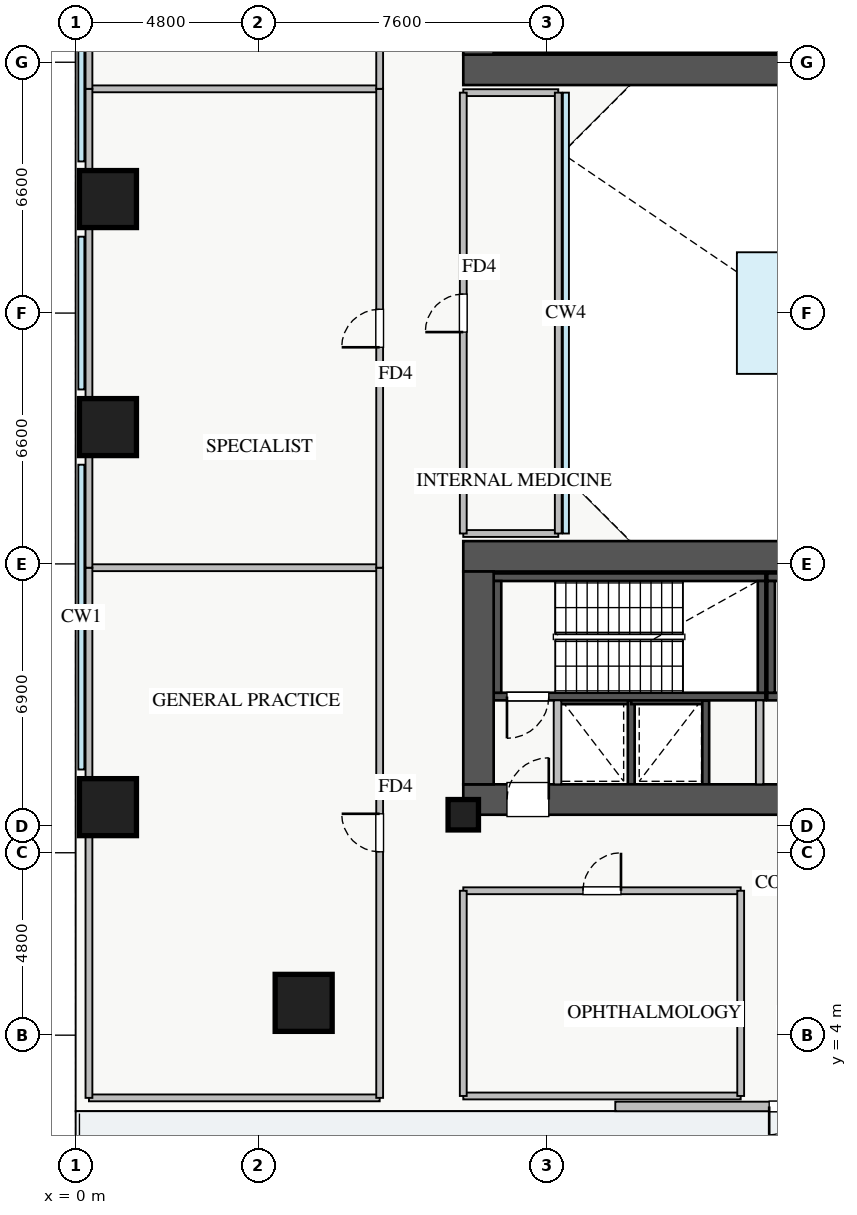
"""IFC4 building model, lengths in metres.
Left out: names, types, materials, properties, quantities, classifications, styles, units other than length and angle.
Written with IfcOpenShell. Run it as: python <this file> out.ifc"""

import sys

from ifc_helpers import new_model, si_unit, direction, frame, frame_2d, origin, origin_2d, place, context, subcontext, project, spatial, rectangle, extrude, source, transform, mapped, element, fill, save


model = new_model("IFC4")
c1 = context("Model", 3, precision=1e-05, world=origin(), true_north=direction((0.0, 1.0)))
c2 = subcontext(c1, "Body", "Model", "MODEL_VIEW")
j1 = project(units=[si_unit("LENGTHUNIT", "METRE"), si_unit("PLANEANGLEUNIT", "RADIAN")], contexts=[c1])
p1 = place(None, origin())
s1 = spatial("IfcSite", under=j1, at=p1, CompositionType="ELEMENT")
p2 = place(p1, origin())
s2 = spatial("IfcBuilding", under=s1, at=p2, CompositionType="ELEMENT")
p3 = place(p2, frame((0.0, 0.0, 5.0)))
s3 = spatial("IfcBuildingStorey", under=s2, at=p3, CompositionType="ELEMENT", Elevation=5.0)
p4 = place(p3, frame((12.68, 12.8, 0.0), z_axis=(0.0, 0.0, 1.0), x_axis=(1.0, 0.0, 0.0)))
e1 = element("IfcWall", 1, at=p4, inside=s3, PredefinedType="SHEAR", context=c2, shape_type="SweptSolid", body=[
    extrude(rectangle(XDim=1.94, YDim=0.18, at=frame_2d((0.97, 0.0))), origin(), (0.0, 0.0, 1.0), 4.18),
])
p5 = place(p3, frame((14.62, 10.6, 0.0), z_axis=(0.0, 0.0, 1.0), x_axis=(0.0, 1.0, 0.0)))
e2 = element("IfcWall", 2, at=p5, inside=s3, PredefinedType="SHEAR", context=c2, shape_type="SweptSolid", body=[
    extrude(rectangle(XDim=2.2, YDim=0.18, at=frame_2d((1.1, 0.0))), origin(), (0.0, 0.0, 1.0), 4.18),
])
p6 = place(p3, frame((14.62, 12.8, 0.0), z_axis=(0.0, 0.0, 1.0), x_axis=(1.0, 0.0, 0.0)))
e3 = element("IfcWall", 3, at=p6, inside=s3, PredefinedType="SHEAR", context=c2, shape_type="SweptSolid", body=[
    extrude(rectangle(XDim=1.96, YDim=0.18, at=frame_2d((0.98, 0.0))), origin(), (0.0, 0.0, 1.0), 4.18),
])
p7 = place(p3, frame((16.58, 10.6, 0.0), z_axis=(0.0, 0.0, 1.0), x_axis=(0.0, 1.0, 0.0)))
e4 = element("IfcWall", 4, at=p7, inside=s3, PredefinedType="SHEAR", context=c2, shape_type="SweptSolid", body=[
    extrude(rectangle(XDim=2.2, YDim=0.18, at=frame_2d((1.1, 0.0))), origin(), (0.0, 0.0, 1.0), 4.18),
])
p8 = place(p3, frame((11.0, 29.95, 0.0), z_axis=(0.0, 0.0, 1.0), x_axis=(1.0, 0.0, 0.0)))
e5 = element("IfcWall", 5, at=p8, inside=s3, PredefinedType="SHEAR", context=c2, shape_type="SweptSolid", body=[
    extrude(rectangle(XDim=7.15, YDim=0.2, at=frame_2d((3.575, 0.0))), origin(), (0.0, 0.0, 1.0), 4.4),
])
p9 = place(p3, frame((18.2, 29.95, 0.0), z_axis=(0.0, 0.0, 1.0), x_axis=(1.0, 0.0, 0.0)))
e6 = element("IfcWall", 6, at=p9, inside=s3, PredefinedType="SHEAR", context=c2, shape_type="SweptSolid", body=[
    extrude(rectangle(XDim=7.15, YDim=0.2, at=frame_2d((3.575, 0.0))), origin(), (0.0, 0.0, 1.0), 4.4),
])
p10 = place(p3, frame((11.0, 12.91, 0.0), z_axis=(0.0, 0.0, 1.0), x_axis=(1.0, 0.0, 0.0)))
e7 = element("IfcWall", 7, at=p10, inside=s3, PredefinedType="SHEAR", context=c2, shape_type="SweptSolid", body=[
    extrude(rectangle(XDim=7.15, YDim=0.2, at=frame_2d((3.575, 0.0))), origin(), (0.0, 0.0, 1.0), 4.4),
])
p11 = place(p10, frame((0.35, 0.0, 0.0)))
e8 = element("IfcOpeningElement", 8, at=p11, cuts=e7, PredefinedType="OPENING", context=c2, shape_type="SweptSolid", body=[
    extrude(rectangle(XDim=1.1, YDim=2.05, at=frame_2d((0.55, 1.025))), frame((0.0, 0.11, 0.0), z_axis=(0.0, -1.0, 0.0), x_axis=(1.0, 0.0, 0.0)), (0.0, 0.0, 1.0), 0.22),
])
p12 = place(p3, frame((11.0, 16.05, 0.0), z_axis=(0.0, 0.0, 1.0), x_axis=(1.0, 0.0, 0.0)))
e9 = element("IfcWall", 9, at=p12, inside=s3, PredefinedType="SHEAR", context=c2, shape_type="SweptSolid", body=[
    extrude(rectangle(XDim=7.15, YDim=0.2, at=frame_2d((3.575, 0.0))), origin(), (0.0, 0.0, 1.0), 4.4),
])
for number, where, z_axis, x_axis in (
    (10, (11.1, 13.01, 0.0), (0.0, 0.0, 1.0), (0.0, 1.0, 0.0)),
    (11, (18.05, 13.01, 0.0), (0.0, 0.0, 1.0), (0.0, 1.0, 0.0)),
):
    element("IfcWall", number, at=place(p3, frame(where, z_axis=z_axis, x_axis=x_axis)), inside=s3, PredefinedType="SHEAR", context=c2, shape_type="SweptSolid", body=[
        extrude(rectangle(XDim=2.94, YDim=0.2, at=frame_2d((1.47, 0.0))), origin(), (0.0, 0.0, 1.0), 4.4),
    ])
p13 = place(p3, frame((18.2, 12.91, 0.0), z_axis=(0.0, 0.0, 1.0), x_axis=(1.0, 0.0, 0.0)))
e12 = element("IfcWall", 12, at=p13, inside=s3, PredefinedType="SHEAR", context=c2, shape_type="SweptSolid", body=[
    extrude(rectangle(XDim=7.15, YDim=0.2, at=frame_2d((3.575, 0.0))), origin(), (0.0, 0.0, 1.0), 4.4),
])
p14 = place(p13, frame((0.35, 0.0, 0.0)))
e13 = element("IfcOpeningElement", 13, at=p14, cuts=e12, PredefinedType="OPENING", context=c2, shape_type="SweptSolid", body=[
    extrude(rectangle(XDim=1.1, YDim=2.05, at=frame_2d((0.55, 1.025))), frame((0.0, 0.11, 0.0), z_axis=(0.0, -1.0, 0.0), x_axis=(1.0, 0.0, 0.0)), (0.0, 0.0, 1.0), 0.22),
])
p15 = place(p3, frame((18.2, 16.05, 0.0), z_axis=(0.0, 0.0, 1.0), x_axis=(1.0, 0.0, 0.0)))
e14 = element("IfcWall", 14, at=p15, inside=s3, PredefinedType="SHEAR", context=c2, shape_type="SweptSolid", body=[
    extrude(rectangle(XDim=7.15, YDim=0.2, at=frame_2d((3.575, 0.0))), origin(), (0.0, 0.0, 1.0), 4.4),
])
p16 = place(p3, frame((18.3, 13.01, 0.0), z_axis=(0.0, 0.0, 1.0), x_axis=(0.0, 1.0, 0.0)))
e15 = element("IfcWall", 15, at=p16, inside=s3, PredefinedType="SHEAR", context=c2, shape_type="SweptSolid", body=[
    extrude(rectangle(XDim=2.94, YDim=0.2, at=frame_2d((1.47, 0.0))), origin(), (0.0, 0.0, 1.0), 4.4),
])
p17 = place(p3, frame((10.2, 29.4, 0.0), z_axis=(0.0, 0.0, 1.0), x_axis=(1.0, 0.0, 0.0)))
e16 = element("IfcWall", 16, at=p17, inside=s3, PredefinedType="SHEAR", context=c2, shape_type="SweptSolid", body=[
    extrude(rectangle(XDim=17.6, YDim=0.8, at=frame_2d((8.8, 0.0))), origin(), (0.0, 0.0, 1.0), 4.4),
])
p18 = place(p3, frame((10.6, 29.8, 0.0), z_axis=(0.0, 0.0, 1.0), x_axis=(0.0, 1.0, 0.0)))
e17 = element("IfcWall", 17, at=p18, inside=s3, PredefinedType="SHEAR", context=c2, shape_type="SweptSolid", body=[
    extrude(rectangle(XDim=5.6, YDim=0.8, at=frame_2d((2.8, 0.0))), origin(), (0.0, 0.0, 1.0), 4.4),
])
p19 = place(p3, frame((10.2, 10.2, 0.0), z_axis=(0.0, 0.0, 1.0), x_axis=(1.0, 0.0, 0.0)))
e18 = element("IfcWall", 18, at=p19, inside=s3, PredefinedType="SHEAR", context=c2, shape_type="SweptSolid", body=[
    extrude(rectangle(XDim=17.6, YDim=0.8, at=frame_2d((8.8, 0.0))), origin(), (0.0, 0.0, 1.0), 4.4),
])
p20 = place(p19, frame((1.15, 0.0, 0.0)))
e19 = element("IfcOpeningElement", 19, at=p20, cuts=e18, PredefinedType="OPENING", context=c2, shape_type="SweptSolid", body=[
    extrude(rectangle(XDim=1.1, YDim=2.05, at=frame_2d((0.55, 1.025))), frame((0.0, 0.41, 0.0), z_axis=(0.0, -1.0, 0.0), x_axis=(1.0, 0.0, 0.0)), (0.0, 0.0, 1.0), 0.82),
])
p21 = place(p19, frame((8.3, 0.0, 0.0)))
e20 = element("IfcOpeningElement", 20, at=p21, cuts=e18, PredefinedType="OPENING", context=c2, shape_type="SweptSolid", body=[
    extrude(rectangle(XDim=1.1, YDim=2.05, at=frame_2d((0.55, 1.025))), frame((0.0, 0.41, 0.0), z_axis=(0.0, -1.0, 0.0), x_axis=(1.0, 0.0, 0.0)), (0.0, 0.0, 1.0), 0.82),
])
p22 = place(p19, frame((10.05, 0.0, 0.0)))
e21 = element("IfcOpeningElement", 21, at=p22, cuts=e18, PredefinedType="OPENING", context=c2, shape_type="SweptSolid", body=[
    extrude(rectangle(XDim=1.1, YDim=2.05, at=frame_2d((0.55, 1.025))), frame((0.0, 0.41, 0.0), z_axis=(0.0, -1.0, 0.0), x_axis=(1.0, 0.0, 0.0)), (0.0, 0.0, 1.0), 0.82),
])
p23 = place(p19, frame((14.74, 0.0, 0.0)))
e22 = element("IfcOpeningElement", 22, at=p23, cuts=e18, PredefinedType="OPENING", context=c2, shape_type="SweptSolid", body=[
    extrude(rectangle(XDim=1.0, YDim=2.05, at=frame_2d((0.5, 1.025))), frame((0.0, 0.41, 0.0), z_axis=(0.0, -1.0, 0.0), x_axis=(1.0, 0.0, 0.0)), (0.0, 0.0, 1.0), 0.82),
])
p24 = place(p19, frame((12.585, 0.0, 0.0)))
e23 = element("IfcOpeningElement", 23, at=p24, cuts=e18, PredefinedType="OPENING", context=c2, shape_type="SweptSolid", body=[
    extrude(rectangle(XDim=1.0, YDim=2.05, at=frame_2d((0.5, 1.025))), frame((0.0, 0.41, 0.0), z_axis=(0.0, -1.0, 0.0), x_axis=(1.0, 0.0, 0.0)), (0.0, 0.0, 1.0), 0.82),
])
p25 = place(p3, frame((10.2, 16.6, 0.0), z_axis=(0.0, 0.0, 1.0), x_axis=(1.0, 0.0, 0.0)))
e24 = element("IfcWall", 24, at=p25, inside=s3, PredefinedType="SHEAR", context=c2, shape_type="SweptSolid", body=[
    extrude(rectangle(XDim=17.6, YDim=0.8, at=frame_2d((8.8, 0.0))), origin(), (0.0, 0.0, 1.0), 4.4),
])
p26 = place(p3, frame((10.6, 10.6, 0.0), z_axis=(0.0, 0.0, 1.0), x_axis=(0.0, 1.0, 0.0)))
e25 = element("IfcWall", 25, at=p26, inside=s3, PredefinedType="SHEAR", context=c2, shape_type="SweptSolid", body=[
    extrude(rectangle(XDim=5.6, YDim=0.8, at=frame_2d((2.8, 0.0))), origin(), (0.0, 0.0, 1.0), 4.4),
])
m1 = source(origin(), c2, "Body", "SweptSolid", [
    extrude(rectangle(XDim=1.5, YDim=1.5, at=origin_2d()), origin(), (0.0, 0.0, 1.0), 4.4),
])
for number, where, z_axis, x_axis in (
    (26, (6.0, 4.85, 0.0), (0.0, 0.0, 1.0), (1.0, 0.0, 0.0)),
    (27, (0.85, 26.0, 0.0), (0.0, 0.0, 1.0), (1.0, 0.0, 0.0)),
    (28, (0.85, 20.0, 0.0), (0.0, 0.0, 1.0), (1.0, 0.0, 0.0)),
    (29, (0.85, 10.0, 0.0), (0.0, 0.0, 1.0), (1.0, 0.0, 0.0)),
):
    element("IfcColumn", number, at=place(p3, frame(where, z_axis=z_axis, x_axis=x_axis)), inside=s3, PredefinedType="COLUMN", context=c2, shape_type="MappedRepresentation", body=[
        mapped(m1, transform((0.0, 0.0, 0.0), x_axis=(1.0, 0.0, 0.0), y_axis=(0.0, 1.0, 0.0), z_axis=(0.0, 0.0, 1.0), scale=1.0)),
    ])
m2 = source(origin(), c2, "Body", "SweptSolid", [
    extrude(rectangle(XDim=0.8, YDim=0.8, at=origin_2d()), origin(), (0.0, 0.0, 1.0), 4.4),
])
p27 = place(p3, frame((10.2, 9.8, 0.0), z_axis=(0.0, 0.0, 1.0), x_axis=(1.0, 0.0, 0.0)))
e30 = element("IfcColumn", 30, at=p27, inside=s3, PredefinedType="PILASTER", context=c2, shape_type="MappedRepresentation", body=[
    mapped(m2, transform((0.0, 0.0, 0.0), x_axis=(1.0, 0.0, 0.0), y_axis=(0.0, 1.0, 0.0), z_axis=(0.0, 0.0, 1.0), scale=1.0)),
])
p28 = place(p3, frame((14.2, 2.125, 0.0), z_axis=(0.0, 0.0, 1.0), x_axis=(1.0, 0.0, 0.0)))
e31 = element("IfcWall", 31, at=p28, inside=s3, PredefinedType="STANDARD", context=c2, shape_type="SweptSolid", body=[
    extrude(rectangle(XDim=9.6, YDim=0.25, at=frame_2d((4.8, 0.0))), origin(), (0.0, 0.0, 1.0), 3.72),
])
p29 = place(p28, frame((4.05, 0.0, 0.0)))
e32 = element("IfcOpeningElement", 32, at=p29, cuts=e31, PredefinedType="OPENING", context=c2, shape_type="SweptSolid", body=[
    extrude(rectangle(XDim=1.5, YDim=2.15, at=frame_2d((0.75, 1.075))), frame((0.0, 0.135, 0.0), z_axis=(0.0, -1.0, 0.0), x_axis=(1.0, 0.0, 0.0)), (0.0, 0.0, 1.0), 0.27),
])
for number, where, z_axis, x_axis in (
    (33, (12.68, 10.6, 0.0), (0.0, 0.0, 1.0), (0.0, 1.0, 0.0)),
    (34, (18.0, 10.6, 0.0), (0.0, 0.0, 1.0), (0.0, 1.0, 0.0)),
):
    element("IfcWall", number, at=place(p3, frame(where, z_axis=z_axis, x_axis=x_axis)), inside=s3, PredefinedType="PARTITIONING", context=c2, shape_type="SweptSolid", body=[
        extrude(rectangle(XDim=2.21, YDim=0.2, at=frame_2d((1.105, 0.0))), origin(), (0.0, 0.0, 1.0), 4.18),
    ])
p30 = place(p3, frame((0.35, 2.35, 0.0), z_axis=(0.0, 0.0, 1.0), x_axis=(1.0, 0.0, 0.0)))
e35 = element("IfcWall", 35, at=p30, inside=s3, PredefinedType="PARTITIONING", context=c2, shape_type="SweptSolid", body=[
    extrude(rectangle(XDim=7.65, YDim=0.18, at=frame_2d((3.825, 0.0))), origin(), (0.0, 0.0, 1.0), 4.18),
])
p31 = place(p3, frame((0.35, 16.3, 0.0), z_axis=(0.0, 0.0, 1.0), x_axis=(1.0, 0.0, 0.0)))
e36 = element("IfcWall", 36, at=p31, inside=s3, PredefinedType="PARTITIONING", context=c2, shape_type="SweptSolid", body=[
    extrude(rectangle(XDim=7.65, YDim=0.18, at=frame_2d((3.825, 0.0))), origin(), (0.0, 0.0, 1.0), 3.575),
])
p32 = place(p3, frame((0.35, 2.35, 0.0), z_axis=(0.0, 0.0, 1.0), x_axis=(0.0, 1.0, 0.0)))
e37 = element("IfcWall", 37, at=p32, inside=s3, PredefinedType="PARTITIONING", context=c2, shape_type="SweptSolid", body=[
    extrude(rectangle(XDim=13.95, YDim=0.18, at=frame_2d((6.975, 0.0))), origin(), (0.0, 0.0, 1.0), 4.18),
])
p33 = place(p3, frame((8.0, 2.35, 0.0), z_axis=(0.0, 0.0, 1.0), x_axis=(0.0, 1.0, 0.0)))
e38 = element("IfcWall", 38, at=p33, inside=s3, PredefinedType="PARTITIONING", context=c2, shape_type="SweptSolid", body=[
    extrude(rectangle(XDim=13.95, YDim=0.18, at=frame_2d((6.975, 0.0))), origin(), (0.0, 0.0, 1.0), 4.18),
])
p34 = place(p33, frame((6.475, 0.0, 0.0)))
e39 = element("IfcOpeningElement", 39, at=p34, cuts=e38, PredefinedType="OPENING", context=c2, shape_type="SweptSolid", body=[
    extrude(rectangle(XDim=1.0, YDim=2.05, at=frame_2d((0.5, 1.025))), frame((0.0, 0.1, 0.0), z_axis=(0.0, -1.0, 0.0), x_axis=(1.0, 0.0, 0.0)), (0.0, 0.0, 1.0), 0.2),
])
p35 = place(p3, frame((0.35, 28.9, 0.0), z_axis=(0.0, 0.0, 1.0), x_axis=(1.0, 0.0, 0.0)))
e40 = element("IfcWall", 40, at=p35, inside=s3, PredefinedType="PARTITIONING", context=c2, shape_type="SweptSolid", body=[
    extrude(rectangle(XDim=7.65, YDim=0.18, at=frame_2d((3.825, 0.0))), origin(), (0.0, 0.0, 1.0), 4.18),
])
p36 = place(p3, frame((0.35, 16.3, 0.0), z_axis=(0.0, 0.0, 1.0), x_axis=(0.0, 1.0, 0.0)))
e41 = element("IfcWall", 41, at=p36, inside=s3, PredefinedType="PARTITIONING", context=c2, shape_type="SweptSolid", body=[
    extrude(rectangle(XDim=12.6, YDim=0.18, at=frame_2d((6.3, 0.0))), origin(), (0.0, 0.0, 1.0), 4.18),
])
p37 = place(p3, frame((8.0, 16.3, 0.0), z_axis=(0.0, 0.0, 1.0), x_axis=(0.0, 1.0, 0.0)))
e42 = element("IfcWall", 42, at=p37, inside=s3, PredefinedType="PARTITIONING", context=c2, shape_type="SweptSolid", body=[
    extrude(rectangle(XDim=12.6, YDim=0.18, at=frame_2d((6.3, 0.0))), origin(), (0.0, 0.0, 1.0), 4.18),
])
p38 = place(p37, frame((5.8, 0.0, 0.0)))
e43 = element("IfcOpeningElement", 43, at=p38, cuts=e42, PredefinedType="OPENING", context=c2, shape_type="SweptSolid", body=[
    extrude(rectangle(XDim=1.0, YDim=2.05, at=frame_2d((0.5, 1.025))), frame((0.0, 0.1, 0.0), z_axis=(0.0, -1.0, 0.0), x_axis=(1.0, 0.0, 0.0)), (0.0, 0.0, 1.0), 0.2),
])
p39 = place(p3, frame((0.35, 28.9, 0.0), z_axis=(0.0, 0.0, 1.0), x_axis=(0.0, 1.0, 0.0)))
e44 = element("IfcWall", 44, at=p39, inside=s3, PredefinedType="PARTITIONING", context=c2, shape_type="SweptSolid", body=[
    extrude(rectangle(XDim=14.75, YDim=0.18, at=frame_2d((7.375, 0.0))), origin(), (0.0, 0.0, 1.0), 4.18),
])
p40 = place(p3, frame((8.0, 28.9, 0.0), z_axis=(0.0, 0.0, 1.0), x_axis=(0.0, 1.0, 0.0)))
e45 = element("IfcWall", 45, at=p40, inside=s3, PredefinedType="PARTITIONING", context=c2, shape_type="SweptSolid", body=[
    extrude(rectangle(XDim=14.75, YDim=0.18, at=frame_2d((7.375, 0.0))), origin(), (0.0, 0.0, 1.0), 4.18),
])
p41 = place(p40, frame((6.875, 0.0, 0.0)))
e46 = element("IfcOpeningElement", 46, at=p41, cuts=e45, PredefinedType="OPENING", context=c2, shape_type="SweptSolid", body=[
    extrude(rectangle(XDim=1.0, YDim=2.05, at=frame_2d((0.5, 1.025))), frame((0.0, 0.1, 0.0), z_axis=(0.0, -1.0, 0.0), x_axis=(1.0, 0.0, 0.0)), (0.0, 0.0, 1.0), 0.2),
])
for number, where, z_axis, x_axis in (
    (47, (10.2, 17.2, 0.0), (0.0, 0.0, 1.0), (1.0, 0.0, 0.0)),
    (48, (10.2, 28.8, 0.0), (0.0, 0.0, 1.0), (1.0, 0.0, 0.0)),
):
    element("IfcWall", number, at=place(p3, frame(where, z_axis=z_axis, x_axis=x_axis)), inside=s3, PredefinedType="PARTITIONING", context=c2, shape_type="SweptSolid", body=[
        extrude(rectangle(XDim=2.5, YDim=0.18, at=frame_2d((1.25, 0.0))), origin(), (0.0, 0.0, 1.0), 4.18),
    ])
p42 = place(p3, frame((10.2, 17.2, 0.0), z_axis=(0.0, 0.0, 1.0), x_axis=(0.0, 1.0, 0.0)))
e49 = element("IfcWall", 49, at=p42, inside=s3, PredefinedType="PARTITIONING", context=c2, shape_type="SweptSolid", body=[
    extrude(rectangle(XDim=11.6, YDim=0.18, at=frame_2d((5.8, 0.0))), origin(), (0.0, 0.0, 1.0), 4.18),
])
p43 = place(p42, frame((5.3, 0.0, 0.0)))
e50 = element("IfcOpeningElement", 50, at=p43, cuts=e49, PredefinedType="OPENING", context=c2, shape_type="SweptSolid", body=[
    extrude(rectangle(XDim=1.0, YDim=2.05, at=frame_2d((0.5, 1.025))), frame((0.0, 0.1, 0.0), z_axis=(0.0, -1.0, 0.0), x_axis=(1.0, 0.0, 0.0)), (0.0, 0.0, 1.0), 0.2),
])
p44 = place(p3, frame((12.7, 17.2, 0.0), z_axis=(0.0, 0.0, 1.0), x_axis=(0.0, 1.0, 0.0)))
e51 = element("IfcWall", 51, at=p44, inside=s3, PredefinedType="PARTITIONING", context=c2, shape_type="SweptSolid", body=[
    extrude(rectangle(XDim=11.6, YDim=0.18, at=frame_2d((5.8, 0.0))), origin(), (0.0, 0.0, 1.0), 4.18),
])
p45 = place(p3, frame((10.2, 2.4, 0.0), z_axis=(0.0, 0.0, 1.0), x_axis=(1.0, 0.0, 0.0)))
e52 = element("IfcWall", 52, at=p45, inside=s3, PredefinedType="PARTITIONING", context=c2, shape_type="SweptSolid", body=[
    extrude(rectangle(XDim=7.3, YDim=0.18, at=frame_2d((3.65, 0.0))), origin(), (0.0, 0.0, 1.0), 4.18),
])
p46 = place(p3, frame((10.2, 7.8, 0.0), z_axis=(0.0, 0.0, 1.0), x_axis=(1.0, 0.0, 0.0)))
e53 = element("IfcWall", 53, at=p46, inside=s3, PredefinedType="PARTITIONING", context=c2, shape_type="SweptSolid", body=[
    extrude(rectangle(XDim=7.3, YDim=0.18, at=frame_2d((3.65, 0.0))), origin(), (0.0, 0.0, 1.0), 4.18),
])
p47 = place(p46, frame((3.15, 0.0, 0.0)))
e54 = element("IfcOpeningElement", 54, at=p47, cuts=e53, PredefinedType="OPENING", context=c2, shape_type="SweptSolid", body=[
    extrude(rectangle(XDim=1.0, YDim=2.05, at=frame_2d((0.5, 1.025))), frame((0.0, 0.1, 0.0), z_axis=(0.0, -1.0, 0.0), x_axis=(1.0, 0.0, 0.0)), (0.0, 0.0, 1.0), 0.2),
])
for number, where, z_axis, x_axis in (
    (55, (10.2, 2.4, 0.0), (0.0, 0.0, 1.0), (0.0, 1.0, 0.0)),
    (56, (17.5, 2.4, 0.0), (0.0, 0.0, 1.0), (0.0, 1.0, 0.0)),
):
    element("IfcWall", number, at=place(p3, frame(where, z_axis=z_axis, x_axis=x_axis)), inside=s3, PredefinedType="PARTITIONING", context=c2, shape_type="SweptSolid", body=[
        extrude(rectangle(XDim=5.4, YDim=0.18, at=frame_2d((2.7, 0.0))), origin(), (0.0, 0.0, 1.0), 4.18),
    ])
p48 = place(p3, frame((0.0, 0.0, -0.22)))
p49 = place(p48, frame((19.0, 23.0, 0.0)))
p50 = place(p49, frame((0.0, 0.0, 0.17)))
e57 = element("IfcWindow", 57, at=p50, inside=s3, PartitioningType="SINGLE_PANEL", PredefinedType="SKYLIGHT", context=c2, shape_type="SweptSolid", body=[
    extrude(rectangle(XDim=3.2, YDim=3.2, at=origin_2d()), origin(), (0.0, 0.0, 1.0), 0.05),
])
m3 = source(origin(), c2, "Body", "SweptSolid", [
    extrude(rectangle(XDim=1.5, YDim=2.15, at=frame_2d((0.75, 1.075))), frame((0.0, 0.025, 0.0), z_axis=(0.0, -1.0, 0.0), x_axis=(1.0, 0.0, 0.0)), (0.0, 0.0, 1.0), 0.05),
])
p51 = place(p29, frame((1.5, 0.0, 0.0), z_axis=(0.0, 0.0, 1.0), x_axis=(-1.0, 0.0, 0.0)))
e58 = element("IfcDoor", 58, at=p51, inside=s3, OperationType="DOUBLE_DOOR_SINGLE_SWING", PredefinedType="DOOR", context=c2, shape_type="MappedRepresentation", body=[
    mapped(m3, transform((0.0, 0.0, 0.0), x_axis=(1.0, 0.0, 0.0), y_axis=(0.0, 1.0, 0.0), z_axis=(0.0, 0.0, 1.0), scale=1.0)),
])
fill(e32, e58)
m4 = source(origin(), c2, "Body", "SweptSolid", [
    extrude(rectangle(XDim=1.1, YDim=2.05, at=frame_2d((0.55, 1.025))), frame((0.0, 0.025, 0.0), z_axis=(0.0, -1.0, 0.0), x_axis=(1.0, 0.0, 0.0)), (0.0, 0.0, 1.0), 0.05),
])
p52 = place(p20, origin())
e59 = element("IfcDoor", 59, at=p52, inside=s3, OperationType="SINGLE_SWING_RIGHT", PredefinedType="DOOR", context=c2, shape_type="MappedRepresentation", body=[
    mapped(m4, transform((0.0, 0.0, 0.0), x_axis=(1.0, 0.0, 0.0), y_axis=(0.0, 1.0, 0.0), z_axis=(0.0, 0.0, 1.0), scale=1.0)),
])
fill(e19, e59)
p53 = place(p11, frame((1.1, 0.0, 0.0), z_axis=(0.0, 0.0, 1.0), x_axis=(-1.0, 0.0, 0.0)))
e60 = element("IfcDoor", 60, at=p53, inside=s3, OperationType="SINGLE_SWING_LEFT", PredefinedType="DOOR", context=c2, shape_type="MappedRepresentation", body=[
    mapped(m4, transform((0.0, 0.0, 0.0), x_axis=(1.0, 0.0, 0.0), y_axis=(0.0, 1.0, 0.0), z_axis=(0.0, 0.0, 1.0), scale=1.0)),
])
fill(e8, e60)
m5 = source(origin(), c2, "Body", "SweptSolid", [
    extrude(rectangle(XDim=1.0, YDim=2.05, at=frame_2d((0.5, 1.025))), frame((0.0, 0.025, 0.0), z_axis=(0.0, -1.0, 0.0), x_axis=(1.0, 0.0, 0.0)), (0.0, 0.0, 1.0), 0.05),
])
p54 = place(p34, origin())
e61 = element("IfcDoor", 61, at=p54, inside=s3, OperationType="SINGLE_SWING_RIGHT", PredefinedType="DOOR", context=c2, shape_type="MappedRepresentation", body=[
    mapped(m5, transform((0.0, 0.0, 0.0), x_axis=(1.0, 0.0, 0.0), y_axis=(0.0, 1.0, 0.0), z_axis=(0.0, 0.0, 1.0), scale=1.0)),
])
fill(e39, e61)
p55 = place(p38, origin())
e62 = element("IfcDoor", 62, at=p55, inside=s3, OperationType="SINGLE_SWING_LEFT", PredefinedType="DOOR", context=c2, shape_type="MappedRepresentation", body=[
    mapped(m5, transform((0.0, 0.0, 0.0), x_axis=(1.0, 0.0, 0.0), y_axis=(0.0, 1.0, 0.0), z_axis=(0.0, 0.0, 1.0), scale=1.0)),
])
fill(e43, e62)
p56 = place(p43, origin())
e63 = element("IfcDoor", 63, at=p56, inside=s3, OperationType="SINGLE_SWING_LEFT", PredefinedType="DOOR", context=c2, shape_type="MappedRepresentation", body=[
    mapped(m5, transform((0.0, 0.0, 0.0), x_axis=(1.0, 0.0, 0.0), y_axis=(0.0, 1.0, 0.0), z_axis=(0.0, 0.0, 1.0), scale=1.0)),
])
fill(e50, e63)
p57 = place(p47, origin())
e64 = element("IfcDoor", 64, at=p57, inside=s3, OperationType="SINGLE_SWING_RIGHT", PredefinedType="DOOR", context=c2, shape_type="MappedRepresentation", body=[
    mapped(m5, transform((0.0, 0.0, 0.0), x_axis=(1.0, 0.0, 0.0), y_axis=(0.0, 1.0, 0.0), z_axis=(0.0, 0.0, 1.0), scale=1.0)),
])
fill(e54, e64)
save(model, sys.argv[1])
